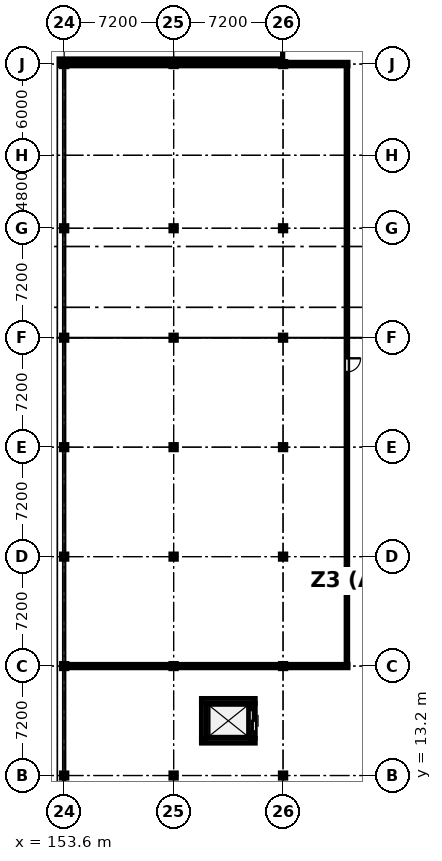
"""IFC4 building model, lengths in metres.
Left out: names, types, materials, properties, quantities, classifications, styles, units other than length and angle.
Written with IfcOpenShell. Run it as: python <this file> out.ifc"""

import sys

from ifc_helpers import new_model, si_unit, direction, frame, frame_2d, origin, origin_2d, place, context, subcontext, project, spatial, rectangle, i_section, extrude, element, fill, save


model = new_model("IFC4")
c1 = context("Model", 3, precision=1e-05, world=origin(), true_north=direction((0.0, 1.0)))
c2 = subcontext(c1, "Body", "Model", "MODEL_VIEW")
j1 = project(units=[si_unit("LENGTHUNIT", "METRE"), si_unit("PLANEANGLEUNIT", "RADIAN")], contexts=[c1])
p1 = place(None, origin())
s1 = spatial("IfcSite", under=j1, at=p1, CompositionType="ELEMENT")
p2 = place(p1, origin())
s2 = spatial("IfcBuilding", under=s1, at=p2, CompositionType="ELEMENT")
p3 = place(p2, frame((0.0, 0.0, 9.3)))
s3 = spatial("IfcBuildingStorey", under=s2, at=p3, CompositionType="ELEMENT", Elevation=9.3)
for number, where, z_axis, x_axis in (
    (1, (153.6, 13.2, 0.0), (0.0, 0.0, 1.0), (1.0, 0.0, 0.0)),
    (2, (153.6, 20.4, 0.0), (0.0, 0.0, 1.0), (1.0, 0.0, 0.0)),
    (3, (153.6, 27.6, 0.0), (0.0, 0.0, 1.0), (1.0, 0.0, 0.0)),
    (4, (153.6, 34.8, 0.0), (0.0, 0.0, 1.0), (1.0, 0.0, 0.0)),
    (5, (153.6, 42.0, 0.0), (0.0, 0.0, 1.0), (1.0, 0.0, 0.0)),
    (6, (153.6, 49.2, 0.0), (0.0, 0.0, 1.0), (1.0, 0.0, 0.0)),
    (7, (153.6, 60.0, 0.0), (0.0, 0.0, 1.0), (1.0, 0.0, 0.0)),
    (8, (160.8, 13.2, 0.0), (0.0, 0.0, 1.0), (1.0, 0.0, 0.0)),
    (9, (160.8, 20.4, 0.0), (0.0, 0.0, 1.0), (1.0, 0.0, 0.0)),
    (10, (160.8, 27.6, 0.0), (0.0, 0.0, 1.0), (1.0, 0.0, 0.0)),
    (11, (160.8, 34.8, 0.0), (0.0, 0.0, 1.0), (1.0, 0.0, 0.0)),
    (12, (160.8, 42.0, 0.0), (0.0, 0.0, 1.0), (1.0, 0.0, 0.0)),
    (13, (160.8, 49.2, 0.0), (0.0, 0.0, 1.0), (1.0, 0.0, 0.0)),
    (14, (160.8, 60.0, 0.0), (0.0, 0.0, 1.0), (1.0, 0.0, 0.0)),
    (15, (168.0, 13.2, 0.0), (0.0, 0.0, 1.0), (1.0, 0.0, 0.0)),
    (16, (168.0, 20.4, 0.0), (0.0, 0.0, 1.0), (1.0, 0.0, 0.0)),
    (17, (168.0, 27.6, 0.0), (0.0, 0.0, 1.0), (1.0, 0.0, 0.0)),
    (18, (168.0, 34.8, 0.0), (0.0, 0.0, 1.0), (1.0, 0.0, 0.0)),
    (19, (168.0, 42.0, 0.0), (0.0, 0.0, 1.0), (1.0, 0.0, 0.0)),
    (20, (168.0, 49.2, 0.0), (0.0, 0.0, 1.0), (1.0, 0.0, 0.0)),
    (21, (168.0, 60.0, 0.0), (0.0, 0.0, 1.0), (1.0, 0.0, 0.0)),
):
    element("IfcColumn", number, at=place(p3, frame(where, z_axis=z_axis, x_axis=x_axis)), inside=s3, PredefinedType="COLUMN", context=c2, shape_type="SweptSolid", body=[
        extrude(i_section(OverallWidth=0.368, OverallDepth=0.356, WebThickness=0.011, FlangeThickness=0.018, FilletRadius=0.015, at=origin_2d()), origin(), (0.0, 0.0, 1.0), 3.9),
    ])
for number, where, z_axis, x_axis in (
    (22, (166.175, 15.488, 0.0), (0.0, 0.0, 1.0), (-1.0, 0.0, 0.0)),
    (23, (162.625, 18.112, 0.0), (0.0, 0.0, 1.0), (1.0, 0.0, 0.0)),
):
    element("IfcWall", number, at=place(p3, frame(where, z_axis=z_axis, x_axis=x_axis)), inside=s3, PredefinedType="SHEAR", context=c2, shape_type="SweptSolid", body=[
        extrude(rectangle(XDim=3.55, YDim=0.325, at=frame_2d((1.775, 0.0))), origin(), (0.0, 0.0, 1.0), 3.6),
    ])
p4 = place(p3, frame((162.788, 15.65, 0.0), z_axis=(0.0, 0.0, 1.0), x_axis=(0.0, 1.0, 0.0)))
e24 = element("IfcWall", 24, at=p4, inside=s3, PredefinedType="SHEAR", context=c2, shape_type="SweptSolid", body=[
    extrude(rectangle(XDim=2.3, YDim=0.325, at=frame_2d((1.15, 0.0))), origin(), (0.0, 0.0, 1.0), 3.6),
])
p5 = place(p3, frame((166.012, 17.95, 0.0), z_axis=(0.0, 0.0, 1.0), x_axis=(0.0, -1.0, 0.0)))
e25 = element("IfcWall", 25, at=p5, inside=s3, PredefinedType="SHEAR", context=c2, shape_type="SweptSolid", body=[
    extrude(rectangle(XDim=2.3, YDim=0.325, at=frame_2d((1.15, 0.0))), origin(), (0.0, 0.0, 1.0), 3.6),
])
p6 = place(p5, frame((0.45, 0.0, 0.0)))
e26 = element("IfcOpeningElement", 26, at=p6, cuts=e25, PredefinedType="OPENING", context=c2, shape_type="SweptSolid", body=[
    extrude(rectangle(XDim=1.4, YDim=2.3, at=frame_2d((0.7, 1.15))), frame((0.0, 0.172, 0.0), z_axis=(0.0, -1.0, 0.0), x_axis=(1.0, 0.0, 0.0)), (0.0, 0.0, 1.0), 0.345),
])
p7 = place(p3, frame((172.28, 20.4, 0.0), z_axis=(0.0, 0.0, 1.0), x_axis=(-1.0, 0.0, 0.0)))
e27 = element("IfcWall", 27, at=p7, inside=s3, PredefinedType="PARTITIONING", context=c2, shape_type="SweptSolid", body=[
    extrude(rectangle(XDim=18.548, YDim=0.235, at=frame_2d((9.274, 0.0))), origin(), (0.0, 0.0, 1.0), 2.823),
])
p8 = place(p3, frame((153.732, 60.0, 0.0), z_axis=(0.0, 0.0, 1.0), x_axis=(1.0, 0.0, 0.0)))
e28 = element("IfcWall", 28, at=p8, inside=s3, PredefinedType="PARTITIONING", context=c2, shape_type="SweptSolid", body=[
    extrude(rectangle(XDim=18.548, YDim=0.25, at=frame_2d((9.274, 0.0))), origin(), (0.0, 0.0, 1.0), 2.823),
])
p9 = place(p3, frame((172.2, 59.873, 0.0), z_axis=(0.0, 0.0, 1.0), x_axis=(0.0, -1.0, 0.0)))
e29 = element("IfcWall", 29, at=p9, inside=s3, PredefinedType="PARTITIONING", context=c2, shape_type="SweptSolid", body=[
    extrude(rectangle(XDim=39.354, YDim=0.115, at=frame_2d((19.677, 0.0))), origin(), (0.0, 0.0, 1.0), 2.823),
])
p10 = place(p9, frame((19.227, 0.0, 0.0)))
e30 = element("IfcOpeningElement", 30, at=p10, cuts=e29, PredefinedType="OPENING", context=c2, shape_type="SweptSolid", body=[
    extrude(rectangle(XDim=0.9, YDim=2.1, at=frame_2d((0.45, 1.05))), frame((0.0, 0.067, 0.0), z_axis=(0.0, -1.0, 0.0), x_axis=(1.0, 0.0, 0.0)), (0.0, 0.0, 1.0), 0.135),
])
p11 = place(p9, frame((21.377, 0.0, 0.95)))
e31 = element("IfcOpeningElement", 31, at=p11, cuts=e29, PredefinedType="OPENING", context=c2, shape_type="SweptSolid", body=[
    extrude(rectangle(XDim=1.4, YDim=1.0, at=frame_2d((0.7, 0.5))), frame((0.0, 0.067, 0.0), z_axis=(0.0, -1.0, 0.0), x_axis=(1.0, 0.0, 0.0)), (0.0, 0.0, 1.0), 0.135),
])
p12 = place(p6, origin())
e32 = element("IfcDoor", 32, at=p12, inside=s3, OperationType="DOUBLE_DOOR_SLIDING", PredefinedType="DOOR", context=c2, shape_type="SweptSolid", body=[
    extrude(rectangle(XDim=1.4, YDim=2.3, at=frame_2d((0.7, 1.15))), frame((0.0, 0.025, 0.0), z_axis=(0.0, -1.0, 0.0), x_axis=(1.0, 0.0, 0.0)), (0.0, 0.0, 1.0), 0.05),
])
fill(e26, e32)
p13 = place(p10, origin())
e33 = element("IfcDoor", 33, at=p13, inside=s3, OperationType="SINGLE_SWING_LEFT", PredefinedType="DOOR", context=c2, shape_type="SweptSolid", body=[
    extrude(rectangle(XDim=0.9, YDim=2.1, at=frame_2d((0.45, 1.05))), frame((0.0, 0.025, 0.0), z_axis=(0.0, -1.0, 0.0), x_axis=(1.0, 0.0, 0.0)), (0.0, 0.0, 1.0), 0.05),
])
fill(e30, e33)
p14 = place(p11, origin())
e34 = element("IfcWindow", 34, at=p14, inside=s3, PartitioningType="SINGLE_PANEL", PredefinedType="WINDOW", context=c2, shape_type="SweptSolid", body=[
    extrude(rectangle(XDim=1.4, YDim=1.0, at=frame_2d((0.7, 0.5))), frame((0.0, 0.03, 0.0), z_axis=(0.0, -1.0, 0.0), x_axis=(1.0, 0.0, 0.0)), (0.0, 0.0, 1.0), 0.06),
])
fill(e31, e34)
save(model, sys.argv[1])
